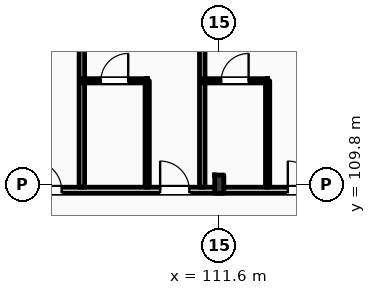
"""IFC4 building model, lengths in metres.
Left out: names, types, materials, properties, quantities, classifications, styles, units other than length and angle.
Written with IfcOpenShell. Run it as: python <this file> out.ifc"""

import sys

from ifc_helpers import new_model, si_unit, direction, frame, frame_2d, origin, origin_2d, place, context, subcontext, project, spatial, rectangle, i_section, extrude, element, fill, save


model = new_model("IFC4")
c1 = context("Model", 3, precision=1e-05, world=origin(), true_north=direction((0.0, 1.0)))
c2 = subcontext(c1, "Body", "Model", "MODEL_VIEW")
j1 = project(units=[si_unit("LENGTHUNIT", "METRE"), si_unit("PLANEANGLEUNIT", "RADIAN")], contexts=[c1])
p1 = place(None, origin())
s1 = spatial("IfcSite", under=j1, at=p1, CompositionType="ELEMENT")
p2 = place(p1, origin())
s2 = spatial("IfcBuilding", under=s1, at=p2, CompositionType="ELEMENT")
p3 = place(p2, frame((0.0, 0.0, 20.4)))
s3 = spatial("IfcBuildingStorey", under=s2, at=p3, CompositionType="ELEMENT", Elevation=20.4)
p4 = place(p3, frame((111.6, 109.8, 0.0), z_axis=(0.0, 0.0, 1.0), x_axis=(1.0, 0.0, 0.0)))
e1 = element("IfcColumn", 1, at=p4, inside=s3, PredefinedType="COLUMN", context=c2, shape_type="SweptSolid", body=[
    extrude(i_section(OverallWidth=0.3, OverallDepth=0.6, WebThickness=0.015, FlangeThickness=0.03, FilletRadius=0.027, at=origin_2d()), origin(), (0.0, 0.0, 1.0), 4.2),
])
p5 = place(p3, frame((10.65, 109.6, 0.0), z_axis=(0.0, 0.0, 1.0), x_axis=(1.0, 0.0, 0.0)))
e2 = element("IfcWall", 2, at=p5, inside=s3, PredefinedType="PARTITIONING", context=c2, shape_type="SweptSolid", body=[
    extrude(rectangle(XDim=109.21, YDim=0.2, at=frame_2d((54.605, 0.0))), origin(), (0.0, 0.0, 1.0), 3.38),
])
p6 = place(p5, frame((12.535, 0.0, 0.0)))
e3 = element("IfcOpeningElement", 3, at=p6, cuts=e2, PredefinedType="OPENING", context=c2, shape_type="SweptSolid", body=[
    extrude(rectangle(XDim=1.02, YDim=2.2, at=frame_2d((0.51, 1.1))), frame((0.0, 0.11, 0.0), z_axis=(0.0, -1.0, 0.0), x_axis=(1.0, 0.0, 0.0)), (0.0, 0.0, 1.0), 0.22),
])
p7 = place(p5, frame((19.175, 0.0, 0.0)))
e4 = element("IfcOpeningElement", 4, at=p7, cuts=e2, PredefinedType="OPENING", context=c2, shape_type="SweptSolid", body=[
    extrude(rectangle(XDim=1.02, YDim=2.2, at=frame_2d((0.51, 1.1))), frame((0.0, 0.11, 0.0), z_axis=(0.0, -1.0, 0.0), x_axis=(1.0, 0.0, 0.0)), (0.0, 0.0, 1.0), 0.22),
])
p8 = place(p5, frame((23.375, 0.0, 0.0)))
e5 = element("IfcOpeningElement", 5, at=p8, cuts=e2, PredefinedType="OPENING", context=c2, shape_type="SweptSolid", body=[
    extrude(rectangle(XDim=1.02, YDim=2.2, at=frame_2d((0.51, 1.1))), frame((0.0, 0.11, 0.0), z_axis=(0.0, -1.0, 0.0), x_axis=(1.0, 0.0, 0.0)), (0.0, 0.0, 1.0), 0.22),
])
p9 = place(p5, frame((27.575, 0.0, 0.0)))
e6 = element("IfcOpeningElement", 6, at=p9, cuts=e2, PredefinedType="OPENING", context=c2, shape_type="SweptSolid", body=[
    extrude(rectangle(XDim=1.02, YDim=2.2, at=frame_2d((0.51, 1.1))), frame((0.0, 0.11, 0.0), z_axis=(0.0, -1.0, 0.0), x_axis=(1.0, 0.0, 0.0)), (0.0, 0.0, 1.0), 0.22),
])
p10 = place(p5, frame((31.805, 0.0, 0.0)))
e7 = element("IfcOpeningElement", 7, at=p10, cuts=e2, PredefinedType="OPENING", context=c2, shape_type="SweptSolid", body=[
    extrude(rectangle(XDim=0.96, YDim=2.2, at=frame_2d((0.48, 1.1))), frame((0.0, 0.11, 0.0), z_axis=(0.0, -1.0, 0.0), x_axis=(1.0, 0.0, 0.0)), (0.0, 0.0, 1.0), 0.22),
])
p11 = place(p5, frame((33.855, 0.0, 0.0)))
e8 = element("IfcOpeningElement", 8, at=p11, cuts=e2, PredefinedType="OPENING", context=c2, shape_type="SweptSolid", body=[
    extrude(rectangle(XDim=0.96, YDim=2.2, at=frame_2d((0.48, 1.1))), frame((0.0, 0.11, 0.0), z_axis=(0.0, -1.0, 0.0), x_axis=(1.0, 0.0, 0.0)), (0.0, 0.0, 1.0), 0.22),
])
p12 = place(p5, frame((40.205, 0.0, 0.0)))
e9 = element("IfcOpeningElement", 9, at=p12, cuts=e2, PredefinedType="OPENING", context=c2, shape_type="SweptSolid", body=[
    extrude(rectangle(XDim=0.96, YDim=2.2, at=frame_2d((0.48, 1.1))), frame((0.0, 0.11, 0.0), z_axis=(0.0, -1.0, 0.0), x_axis=(1.0, 0.0, 0.0)), (0.0, 0.0, 1.0), 0.22),
])
p13 = place(p5, frame((42.255, 0.0, 0.0)))
e10 = element("IfcOpeningElement", 10, at=p13, cuts=e2, PredefinedType="OPENING", context=c2, shape_type="SweptSolid", body=[
    extrude(rectangle(XDim=0.96, YDim=2.2, at=frame_2d((0.48, 1.1))), frame((0.0, 0.11, 0.0), z_axis=(0.0, -1.0, 0.0), x_axis=(1.0, 0.0, 0.0)), (0.0, 0.0, 1.0), 0.22),
])
p14 = place(p5, frame((48.605, 0.0, 0.0)))
e11 = element("IfcOpeningElement", 11, at=p14, cuts=e2, PredefinedType="OPENING", context=c2, shape_type="SweptSolid", body=[
    extrude(rectangle(XDim=0.96, YDim=2.2, at=frame_2d((0.48, 1.1))), frame((0.0, 0.11, 0.0), z_axis=(0.0, -1.0, 0.0), x_axis=(1.0, 0.0, 0.0)), (0.0, 0.0, 1.0), 0.22),
])
p15 = place(p5, frame((50.655, 0.0, 0.0)))
e12 = element("IfcOpeningElement", 12, at=p15, cuts=e2, PredefinedType="OPENING", context=c2, shape_type="SweptSolid", body=[
    extrude(rectangle(XDim=0.96, YDim=2.2, at=frame_2d((0.48, 1.1))), frame((0.0, 0.11, 0.0), z_axis=(0.0, -1.0, 0.0), x_axis=(1.0, 0.0, 0.0)), (0.0, 0.0, 1.0), 0.22),
])
p16 = place(p5, frame((57.005, 0.0, 0.0)))
e13 = element("IfcOpeningElement", 13, at=p16, cuts=e2, PredefinedType="OPENING", context=c2, shape_type="SweptSolid", body=[
    extrude(rectangle(XDim=0.96, YDim=2.2, at=frame_2d((0.48, 1.1))), frame((0.0, 0.11, 0.0), z_axis=(0.0, -1.0, 0.0), x_axis=(1.0, 0.0, 0.0)), (0.0, 0.0, 1.0), 0.22),
])
p17 = place(p5, frame((59.055, 0.0, 0.0)))
e14 = element("IfcOpeningElement", 14, at=p17, cuts=e2, PredefinedType="OPENING", context=c2, shape_type="SweptSolid", body=[
    extrude(rectangle(XDim=0.96, YDim=2.2, at=frame_2d((0.48, 1.1))), frame((0.0, 0.11, 0.0), z_axis=(0.0, -1.0, 0.0), x_axis=(1.0, 0.0, 0.0)), (0.0, 0.0, 1.0), 0.22),
])
p18 = place(p5, frame((65.405, 0.0, 0.0)))
e15 = element("IfcOpeningElement", 15, at=p18, cuts=e2, PredefinedType="OPENING", context=c2, shape_type="SweptSolid", body=[
    extrude(rectangle(XDim=0.96, YDim=2.2, at=frame_2d((0.48, 1.1))), frame((0.0, 0.11, 0.0), z_axis=(0.0, -1.0, 0.0), x_axis=(1.0, 0.0, 0.0)), (0.0, 0.0, 1.0), 0.22),
])
p19 = place(p5, frame((67.205, 0.0, 0.0)))
e16 = element("IfcOpeningElement", 16, at=p19, cuts=e2, PredefinedType="OPENING", context=c2, shape_type="SweptSolid", body=[
    extrude(rectangle(XDim=0.96, YDim=2.2, at=frame_2d((0.48, 1.1))), frame((0.0, 0.11, 0.0), z_axis=(0.0, -1.0, 0.0), x_axis=(1.0, 0.0, 0.0)), (0.0, 0.0, 1.0), 0.22),
])
p20 = place(p5, frame((73.805, 0.0, 0.0)))
e17 = element("IfcOpeningElement", 17, at=p20, cuts=e2, PredefinedType="OPENING", context=c2, shape_type="SweptSolid", body=[
    extrude(rectangle(XDim=0.96, YDim=2.2, at=frame_2d((0.48, 1.1))), frame((0.0, 0.11, 0.0), z_axis=(0.0, -1.0, 0.0), x_axis=(1.0, 0.0, 0.0)), (0.0, 0.0, 1.0), 0.22),
])
p21 = place(p5, frame((78.255, 0.0, 0.0)))
e18 = element("IfcOpeningElement", 18, at=p21, cuts=e2, PredefinedType="OPENING", context=c2, shape_type="SweptSolid", body=[
    extrude(rectangle(XDim=0.96, YDim=2.2, at=frame_2d((0.48, 1.1))), frame((0.0, 0.11, 0.0), z_axis=(0.0, -1.0, 0.0), x_axis=(1.0, 0.0, 0.0)), (0.0, 0.0, 1.0), 0.22),
])
p22 = place(p5, frame((82.205, 0.0, 0.0)))
e19 = element("IfcOpeningElement", 19, at=p22, cuts=e2, PredefinedType="OPENING", context=c2, shape_type="SweptSolid", body=[
    extrude(rectangle(XDim=0.96, YDim=2.2, at=frame_2d((0.48, 1.1))), frame((0.0, 0.11, 0.0), z_axis=(0.0, -1.0, 0.0), x_axis=(1.0, 0.0, 0.0)), (0.0, 0.0, 1.0), 0.22),
])
p23 = place(p5, frame((86.405, 0.0, 0.0)))
e20 = element("IfcOpeningElement", 20, at=p23, cuts=e2, PredefinedType="OPENING", context=c2, shape_type="SweptSolid", body=[
    extrude(rectangle(XDim=0.96, YDim=2.2, at=frame_2d((0.48, 1.1))), frame((0.0, 0.11, 0.0), z_axis=(0.0, -1.0, 0.0), x_axis=(1.0, 0.0, 0.0)), (0.0, 0.0, 1.0), 0.22),
])
p24 = place(p5, frame((90.605, 0.0, 0.0)))
e21 = element("IfcOpeningElement", 21, at=p24, cuts=e2, PredefinedType="OPENING", context=c2, shape_type="SweptSolid", body=[
    extrude(rectangle(XDim=0.96, YDim=2.2, at=frame_2d((0.48, 1.1))), frame((0.0, 0.11, 0.0), z_axis=(0.0, -1.0, 0.0), x_axis=(1.0, 0.0, 0.0)), (0.0, 0.0, 1.0), 0.22),
])
p25 = place(p5, frame((94.805, 0.0, 0.0)))
e22 = element("IfcOpeningElement", 22, at=p25, cuts=e2, PredefinedType="OPENING", context=c2, shape_type="SweptSolid", body=[
    extrude(rectangle(XDim=0.96, YDim=2.2, at=frame_2d((0.48, 1.1))), frame((0.0, 0.11, 0.0), z_axis=(0.0, -1.0, 0.0), x_axis=(1.0, 0.0, 0.0)), (0.0, 0.0, 1.0), 0.22),
])
p26 = place(p5, frame((99.005, 0.0, 0.0)))
e23 = element("IfcOpeningElement", 23, at=p26, cuts=e2, PredefinedType="OPENING", context=c2, shape_type="SweptSolid", body=[
    extrude(rectangle(XDim=0.96, YDim=2.2, at=frame_2d((0.48, 1.1))), frame((0.0, 0.11, 0.0), z_axis=(0.0, -1.0, 0.0), x_axis=(1.0, 0.0, 0.0)), (0.0, 0.0, 1.0), 0.22),
])
p27 = place(p5, frame((103.205, 0.0, 0.0)))
e24 = element("IfcOpeningElement", 24, at=p27, cuts=e2, PredefinedType="OPENING", context=c2, shape_type="SweptSolid", body=[
    extrude(rectangle(XDim=0.96, YDim=2.2, at=frame_2d((0.48, 1.1))), frame((0.0, 0.11, 0.0), z_axis=(0.0, -1.0, 0.0), x_axis=(1.0, 0.0, 0.0)), (0.0, 0.0, 1.0), 0.22),
])
p28 = place(p5, frame((105.335, 0.0, 0.0)))
e25 = element("IfcOpeningElement", 25, at=p28, cuts=e2, PredefinedType="OPENING", context=c2, shape_type="SweptSolid", body=[
    extrude(rectangle(XDim=0.96, YDim=2.2, at=frame_2d((0.48, 1.1))), frame((0.0, 0.11, 0.0), z_axis=(0.0, -1.0, 0.0), x_axis=(1.0, 0.0, 0.0)), (0.0, 0.0, 1.0), 0.22),
])
p29 = place(p5, frame((2.716, 0.0, 0.0)))
e26 = element("IfcOpeningElement", 26, at=p29, cuts=e2, PredefinedType="OPENING", context=c2, shape_type="SweptSolid", body=[
    extrude(rectangle(XDim=1.35, YDim=2.25, at=frame_2d((0.675, 1.125))), frame((0.0, 0.11, 0.0), z_axis=(0.0, -1.0, 0.0), x_axis=(1.0, 0.0, 0.0)), (0.0, 0.0, 1.0), 0.22),
])
p30 = place(p5, frame((6.65, 0.0, 0.0)))
e27 = element("IfcOpeningElement", 27, at=p30, cuts=e2, PredefinedType="OPENING", context=c2, shape_type="SweptSolid", body=[
    extrude(rectangle(XDim=1.35, YDim=2.25, at=frame_2d((0.675, 1.125))), frame((0.0, 0.11, 0.0), z_axis=(0.0, -1.0, 0.0), x_axis=(1.0, 0.0, 0.0)), (0.0, 0.0, 1.0), 0.22),
])
p31 = place(p5, frame((10.583, 0.0, 0.0)))
e28 = element("IfcOpeningElement", 28, at=p31, cuts=e2, PredefinedType="OPENING", context=c2, shape_type="SweptSolid", body=[
    extrude(rectangle(XDim=1.35, YDim=2.25, at=frame_2d((0.675, 1.125))), frame((0.0, 0.11, 0.0), z_axis=(0.0, -1.0, 0.0), x_axis=(1.0, 0.0, 0.0)), (0.0, 0.0, 1.0), 0.22),
])
for number, where, z_axis, x_axis in (
    (29, (107.08, 109.7, 0.0), (0.0, 0.0, 1.0), (0.0, 1.0, 0.0)),
    (30, (111.04, 109.7, 0.0), (0.0, 0.0, 1.0), (0.0, 1.0, 0.0)),
):
    element("IfcWall", number, at=place(p3, frame(where, z_axis=z_axis, x_axis=x_axis)), inside=s3, PredefinedType="PARTITIONING", context=c2, shape_type="SweptSolid", body=[
        extrude(rectangle(XDim=8.15, YDim=0.18, at=frame_2d((4.075, 0.0))), origin(), (0.0, 0.0, 1.0), 3.94),
    ])
p32 = place(p3, frame((109.23, 109.7, 0.0), z_axis=(0.0, 0.0, 1.0), x_axis=(0.0, 1.0, 0.0)))
e31 = element("IfcWall", 31, at=p32, inside=s3, PredefinedType="PARTITIONING", context=c2, shape_type="SweptSolid", body=[
    extrude(rectangle(XDim=3.5, YDim=0.14, at=frame_2d((1.75, 0.0))), origin(), (0.0, 0.0, 1.0), 3.94),
])
p33 = place(p3, frame((107.08, 113.2, 0.0), z_axis=(0.0, 0.0, 1.0), x_axis=(1.0, 0.0, 0.0)))
e32 = element("IfcWall", 32, at=p33, inside=s3, PredefinedType="PARTITIONING", context=c2, shape_type="SweptSolid", body=[
    extrude(rectangle(XDim=2.15, YDim=0.14, at=frame_2d((1.075, 0.0))), origin(), (0.0, 0.0, 1.0), 3.94),
])
p34 = place(p33, frame((0.625, 0.0, 0.0)))
e33 = element("IfcOpeningElement", 33, at=p34, cuts=e32, PredefinedType="OPENING", context=c2, shape_type="SweptSolid", body=[
    extrude(rectangle(XDim=0.9, YDim=2.1, at=frame_2d((0.45, 1.05))), frame((0.0, 0.08, 0.0), z_axis=(0.0, -1.0, 0.0), x_axis=(1.0, 0.0, 0.0)), (0.0, 0.0, 1.0), 0.16),
])
p35 = place(p3, frame((113.19, 109.7, 0.0), z_axis=(0.0, 0.0, 1.0), x_axis=(0.0, 1.0, 0.0)))
e34 = element("IfcWall", 34, at=p35, inside=s3, PredefinedType="PARTITIONING", context=c2, shape_type="SweptSolid", body=[
    extrude(rectangle(XDim=3.5, YDim=0.14, at=frame_2d((1.75, 0.0))), origin(), (0.0, 0.0, 1.0), 3.94),
])
p36 = place(p3, frame((111.04, 113.2, 0.0), z_axis=(0.0, 0.0, 1.0), x_axis=(1.0, 0.0, 0.0)))
e35 = element("IfcWall", 35, at=p36, inside=s3, PredefinedType="PARTITIONING", context=c2, shape_type="SweptSolid", body=[
    extrude(rectangle(XDim=2.15, YDim=0.14, at=frame_2d((1.075, 0.0))), origin(), (0.0, 0.0, 1.0), 3.94),
])
p37 = place(p36, frame((0.625, 0.0, 0.0)))
e36 = element("IfcOpeningElement", 36, at=p37, cuts=e35, PredefinedType="OPENING", context=c2, shape_type="SweptSolid", body=[
    extrude(rectangle(XDim=0.9, YDim=2.1, at=frame_2d((0.45, 1.05))), frame((0.0, 0.08, 0.0), z_axis=(0.0, -1.0, 0.0), x_axis=(1.0, 0.0, 0.0)), (0.0, 0.0, 1.0), 0.16),
])
p38 = place(p25, origin())
e37 = element("IfcDoor", 37, at=p38, inside=s3, OperationType="SINGLE_SWING_LEFT", PredefinedType="DOOR", context=c2, shape_type="SweptSolid", body=[
    extrude(rectangle(XDim=0.96, YDim=2.2, at=frame_2d((0.48, 1.1))), frame((0.0, 0.025, 0.0), z_axis=(0.0, -1.0, 0.0), x_axis=(1.0, 0.0, 0.0)), (0.0, 0.0, 1.0), 0.05),
])
fill(e22, e37)
p39 = place(p26, origin())
e38 = element("IfcDoor", 38, at=p39, inside=s3, OperationType="SINGLE_SWING_LEFT", PredefinedType="DOOR", context=c2, shape_type="SweptSolid", body=[
    extrude(rectangle(XDim=0.96, YDim=2.2, at=frame_2d((0.48, 1.1))), frame((0.0, 0.025, 0.0), z_axis=(0.0, -1.0, 0.0), x_axis=(1.0, 0.0, 0.0)), (0.0, 0.0, 1.0), 0.05),
])
fill(e23, e38)
p40 = place(p34, origin())
e39 = element("IfcDoor", 39, at=p40, inside=s3, OperationType="SINGLE_SWING_RIGHT", PredefinedType="DOOR", context=c2, shape_type="SweptSolid", body=[
    extrude(rectangle(XDim=0.9, YDim=2.1, at=frame_2d((0.45, 1.05))), frame((0.0, 0.025, 0.0), z_axis=(0.0, -1.0, 0.0), x_axis=(1.0, 0.0, 0.0)), (0.0, 0.0, 1.0), 0.05),
])
fill(e33, e39)
p41 = place(p27, origin())
e40 = element("IfcDoor", 40, at=p41, inside=s3, OperationType="SINGLE_SWING_LEFT", PredefinedType="DOOR", context=c2, shape_type="SweptSolid", body=[
    extrude(rectangle(XDim=0.96, YDim=2.2, at=frame_2d((0.48, 1.1))), frame((0.0, 0.025, 0.0), z_axis=(0.0, -1.0, 0.0), x_axis=(1.0, 0.0, 0.0)), (0.0, 0.0, 1.0), 0.05),
])
fill(e24, e40)
p42 = place(p37, origin())
e41 = element("IfcDoor", 41, at=p42, inside=s3, OperationType="SINGLE_SWING_RIGHT", PredefinedType="DOOR", context=c2, shape_type="SweptSolid", body=[
    extrude(rectangle(XDim=0.9, YDim=2.1, at=frame_2d((0.45, 1.05))), frame((0.0, 0.025, 0.0), z_axis=(0.0, -1.0, 0.0), x_axis=(1.0, 0.0, 0.0)), (0.0, 0.0, 1.0), 0.05),
])
fill(e36, e41)
save(model, sys.argv[1])
